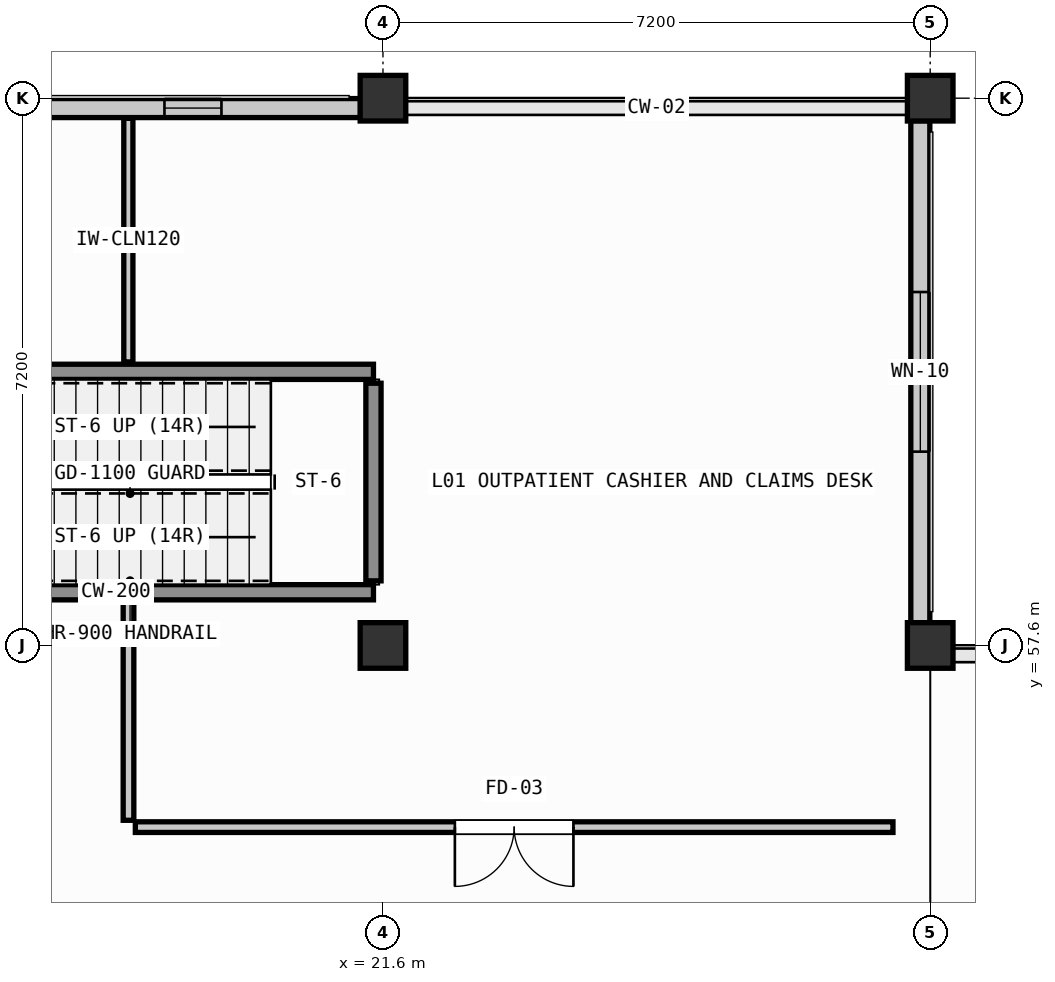
"""IFC4 building model, lengths in metres.
Left out: names, types, materials, properties, quantities, classifications, styles, units other than length and angle.
Written with IfcOpenShell. Run it as: python <this file> out.ifc"""

import sys

from ifc_helpers import new_model, si_unit, direction, frame, frame_2d, origin, origin_2d, place, context, subcontext, project, spatial, rectangle, extrude, element, fill, save


model = new_model("IFC4")
c1 = context("Model", 3, precision=1e-05, world=origin(), true_north=direction((0.0, 1.0)))
c2 = subcontext(c1, "Body", "Model", "MODEL_VIEW")
j1 = project(units=[si_unit("LENGTHUNIT", "METRE"), si_unit("PLANEANGLEUNIT", "RADIAN")], contexts=[c1])
p1 = place(None, origin())
s1 = spatial("IfcSite", under=j1, at=p1, CompositionType="ELEMENT")
p2 = place(p1, origin())
s2 = spatial("IfcBuilding", under=s1, at=p2, CompositionType="ELEMENT")
p3 = place(p2, origin())
s3 = spatial("IfcBuildingStorey", under=s2, at=p3, CompositionType="ELEMENT", Elevation=0.0)
for number, where, z_axis, x_axis in (
    (1, (21.6, 57.6, 0.0), (0.0, 0.0, 1.0), (1.0, 0.0, 0.0)),
    (2, (21.6, 64.8, 0.0), (0.0, 0.0, 1.0), (1.0, 0.0, 0.0)),
):
    element("IfcColumn", number, at=place(p3, frame(where, z_axis=z_axis, x_axis=x_axis)), inside=s3, PredefinedType="COLUMN", context=c2, shape_type="SweptSolid", body=[
        extrude(rectangle(XDim=0.6, YDim=0.6, at=origin_2d()), origin(), (0.0, 0.0, 1.0), 4.56),
    ])
p4 = place(p3, frame((28.8, 57.6, 0.0), z_axis=(0.0, 0.0, 1.0), x_axis=(1.0, 0.0, 0.0)))
e3 = element("IfcColumn", 3, at=p4, inside=s3, PredefinedType="COLUMN", context=c2, shape_type="SweptSolid", body=[
    extrude(rectangle(XDim=0.6, YDim=0.6, at=origin_2d()), origin(), (0.0, 0.0, 1.0), 4.58),
])
p5 = place(p3, frame((28.8, 64.8, 0.0), z_axis=(0.0, 0.0, 1.0), x_axis=(1.0, 0.0, 0.0)))
e4 = element("IfcColumn", 4, at=p5, inside=s3, PredefinedType="COLUMN", context=c2, shape_type="SweptSolid", body=[
    extrude(rectangle(XDim=0.6, YDim=0.6, at=origin_2d()), origin(), (0.0, 0.0, 1.0), 4.56),
])
p6 = place(p3, frame((14.695, 64.67, 0.0), z_axis=(0.0, 0.0, 1.0), x_axis=(1.0, 0.0, 0.0)))
e5 = element("IfcWall", 5, at=p6, inside=s3, PredefinedType="SOLIDWALL", context=c2, shape_type="SweptSolid", body=[
    extrude(rectangle(XDim=6.61, YDim=0.25, at=frame_2d((3.305, 0.0))), origin(), (0.0, 0.0, 1.0), 3.76),
])
p7 = place(p6, frame((4.03, 0.0, 1.5)))
e6 = element("IfcOpeningElement", 6, at=p7, cuts=e5, PredefinedType="OPENING", context=c2, shape_type="SweptSolid", body=[
    extrude(rectangle(XDim=0.75, YDim=0.95, at=frame_2d((0.375, 0.475))), frame((0.0, 0.135, 0.0), z_axis=(0.0, -1.0, 0.0), x_axis=(1.0, 0.0, 0.0)), (0.0, 0.0, 1.0), 0.27),
])
p8 = place(p3, frame((28.67, 64.505, 0.0), z_axis=(0.0, 0.0, 1.0), x_axis=(0.0, -1.0, 0.0)))
e7 = element("IfcWall", 7, at=p8, inside=s3, PredefinedType="SOLIDWALL", context=c2, shape_type="SweptSolid", body=[
    extrude(rectangle(XDim=6.61, YDim=0.25, at=frame_2d((3.305, 0.0))), origin(), (0.0, 0.0, 1.0), 3.76),
])
p9 = place(p8, frame((2.255, 0.0, 2.1)))
e8 = element("IfcOpeningElement", 8, at=p9, cuts=e7, PredefinedType="OPENING", context=c2, shape_type="SweptSolid", body=[
    extrude(rectangle(XDim=2.1, YDim=0.65, at=frame_2d((1.05, 0.325))), frame((0.0, 0.135, 0.0), z_axis=(0.0, -1.0, 0.0), x_axis=(1.0, 0.0, 0.0)), (0.0, 0.0, 1.0), 0.27),
])
p10 = place(p3, frame((14.7, 58.3, 0.0), z_axis=(0.0, 0.0, 1.0), x_axis=(1.0, 0.0, 0.0)))
e9 = element("IfcWall", 9, at=p10, inside=s3, PredefinedType="SHEAR", context=c2, shape_type="SweptSolid", body=[
    extrude(rectangle(XDim=6.775, YDim=0.2, at=frame_2d((3.388, 0.0))), origin(), (0.0, 0.0, 1.0), 4.8),
])
p11 = place(p10, frame((0.22, 0.0, 0.0)))
e10 = element("IfcOpeningElement", 10, at=p11, cuts=e9, PredefinedType="OPENING", context=c2, shape_type="SweptSolid", body=[
    extrude(rectangle(XDim=1.12, YDim=2.14, at=frame_2d((0.56, 1.07))), frame((0.0, 0.11, 0.0), z_axis=(0.0, -1.0, 0.0), x_axis=(1.0, 0.0, 0.0)), (0.0, 0.0, 1.0), 0.22),
])
p12 = place(p3, frame((14.7, 61.2, 0.0), z_axis=(0.0, 0.0, 1.0), x_axis=(1.0, 0.0, 0.0)))
e11 = element("IfcWall", 11, at=p12, inside=s3, PredefinedType="SHEAR", context=c2, shape_type="SweptSolid", body=[
    extrude(rectangle(XDim=6.775, YDim=0.2, at=frame_2d((3.388, 0.0))), origin(), (0.0, 0.0, 1.0), 4.8),
])
p13 = place(p3, frame((21.475, 58.45, 0.0), z_axis=(0.0, 0.0, 1.0), x_axis=(0.0, 1.0, 0.0)))
e12 = element("IfcWall", 12, at=p13, inside=s3, PredefinedType="SHEAR", context=c2, shape_type="SweptSolid", body=[
    extrude(rectangle(XDim=2.6, YDim=0.2, at=frame_2d((1.3, 0.0))), origin(), (0.0, 0.0, 1.0), 4.8),
])
p14 = place(p3, frame((28.31, 55.21, 0.0), z_axis=(0.0, 0.0, 1.0), x_axis=(-1.0, 0.0, 0.0)))
e13 = element("IfcWall", 13, at=p14, inside=s3, PredefinedType="PARTITIONING", context=c2, shape_type="SweptSolid", body=[
    extrude(rectangle(XDim=9.968, YDim=0.14, at=frame_2d((4.984, 0.0))), origin(), (0.0, 0.0, 1.0), 3.86),
])
p15 = place(p14, frame((4.204, 0.0, 0.0)))
e14 = element("IfcOpeningElement", 14, at=p15, cuts=e13, PredefinedType="OPENING", context=c2, shape_type="SweptSolid", body=[
    extrude(rectangle(XDim=1.56, YDim=2.22, at=frame_2d((0.78, 1.11))), frame((0.0, 0.08, 0.0), z_axis=(0.0, -1.0, 0.0), x_axis=(1.0, 0.0, 0.0)), (0.0, 0.0, 1.0), 0.16),
])
p16 = place(p3, frame((18.252, 55.3, 0.0), z_axis=(0.0, 0.0, 1.0), x_axis=(0.0, 1.0, 0.0)))
e15 = element("IfcWall", 15, at=p16, inside=s3, PredefinedType="PARTITIONING", context=c2, shape_type="SweptSolid", body=[
    extrude(rectangle(XDim=2.87, YDim=0.14, at=frame_2d((1.435, 0.0))), origin(), (0.0, 0.0, 1.0), 3.76),
])
p17 = place(p3, frame((18.25, 61.33, 0.0), z_axis=(0.0, 0.0, 1.0), x_axis=(0.0, 1.0, 0.0)))
e16 = element("IfcWall", 16, at=p17, inside=s3, PredefinedType="PARTITIONING", context=c2, shape_type="SweptSolid", body=[
    extrude(rectangle(XDim=3.205, YDim=0.12, at=frame_2d((1.603, 0.0))), origin(), (0.0, 0.0, 1.0), 3.76),
])
p18 = place(p7, origin())
e17 = element("IfcWindow", 17, at=p18, inside=s3, PartitioningType="SINGLE_PANEL", PredefinedType="WINDOW", context=c2, shape_type="SweptSolid", body=[
    extrude(rectangle(XDim=0.75, YDim=0.95, at=frame_2d((0.375, 0.475))), frame((0.0, 0.03, 0.0), z_axis=(0.0, -1.0, 0.0), x_axis=(1.0, 0.0, 0.0)), (0.0, 0.0, 1.0), 0.06),
])
fill(e6, e17)
p19 = place(p9, origin())
e18 = element("IfcWindow", 18, at=p19, inside=s3, PartitioningType="SINGLE_PANEL", PredefinedType="WINDOW", context=c2, shape_type="SweptSolid", body=[
    extrude(rectangle(XDim=2.1, YDim=0.65, at=frame_2d((1.05, 0.325))), frame((0.0, 0.03, 0.0), z_axis=(0.0, -1.0, 0.0), x_axis=(1.0, 0.0, 0.0)), (0.0, 0.0, 1.0), 0.06),
])
fill(e8, e18)
p20 = place(p15, origin())
e19 = element("IfcDoor", 19, at=p20, inside=s3, OperationType="DOUBLE_DOOR_SINGLE_SWING", PredefinedType="DOOR", context=c2, shape_type="SweptSolid", body=[
    extrude(rectangle(XDim=1.56, YDim=2.22, at=frame_2d((0.78, 1.11))), frame((0.0, 0.025, 0.0), z_axis=(0.0, -1.0, 0.0), x_axis=(1.0, 0.0, 0.0)), (0.0, 0.0, 1.0), 0.05),
])
fill(e14, e19)
save(model, sys.argv[1])
